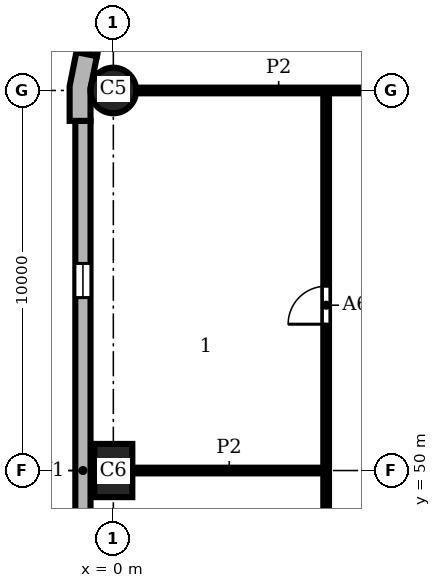
"""IFC4 building model, lengths in metres.
Left out: names, types, materials, properties, quantities, classifications, styles, units other than length and angle.
Written with IfcOpenShell. Run it as: python <this file> out.ifc"""

import sys

from ifc_helpers import new_model, si_unit, direction, frame, frame_2d, origin, origin_2d, place, context, subcontext, project, spatial, polyline, rectangle, circle, outline, extrude, element, fill, save


model = new_model("IFC4")
c1 = context("Model", 3, precision=1e-05, world=origin(), true_north=direction((0.0, 1.0)))
c2 = subcontext(c1, "Body", "Model", "MODEL_VIEW")
j1 = project(units=[si_unit("LENGTHUNIT", "METRE"), si_unit("PLANEANGLEUNIT", "RADIAN")], contexts=[c1])
p1 = place(None, origin())
s1 = spatial("IfcSite", under=j1, at=p1, CompositionType="ELEMENT")
p2 = place(p1, origin())
s2 = spatial("IfcBuilding", under=s1, at=p2, CompositionType="ELEMENT")
p3 = place(p2, frame((0.0, 0.0, 70.5)))
s3 = spatial("IfcBuildingStorey", under=s2, at=p3, CompositionType="ELEMENT", Elevation=70.5)
p4 = place(p3, frame((0.0, 60.0, 0.0), z_axis=(0.0, 0.0, 1.0), x_axis=(1.0, 0.0, 0.0)))
e1 = element("IfcColumn", 1, at=p4, inside=s3, PredefinedType="COLUMN", context=c2, shape_type="SweptSolid", body=[
    extrude(circle(Radius=0.6, at=origin_2d()), origin(), (0.0, 0.0, 1.0), 3.9),
])
p5 = place(p3, frame((0.0, 50.0, 0.0), z_axis=(0.0, 0.0, 1.0), x_axis=(0.0, 1.0, 0.0)))
e2 = element("IfcColumn", 2, at=p5, inside=s3, PredefinedType="COLUMN", context=c2, shape_type="SweptSolid", body=[
    extrude(rectangle(XDim=1.4, YDim=1.0, at=origin_2d()), origin(), (0.0, 0.0, 1.0), 3.9),
])
p6 = place(p3, origin())
e3 = element("IfcWall", 3, at=p6, inside=s3, PredefinedType="SOLIDWALL", context=c2, shape_type="SweptSolid", body=[
    extrude(outline(polyline([(-0.825, 60.98), (-0.972, 61.009), (-1.15, 60.113), (-1.15, 59.2), (-1.0, 59.2), (-0.6, 59.2), (-0.6, 60.059), (-0.432, 60.902), (-0.825, 60.98)])), origin(), (0.0, 0.0, 1.0), 3.9),
])
p7 = place(p3, frame((0.299, 65.602, 0.0), z_axis=(0.0, 0.0, 1.0), x_axis=(-0.195098533057, -0.98078364709, 0.0)))
e4 = element("IfcWall", 4, at=p7, inside=s3, PredefinedType="SOLIDWALL", context=c2, shape_type="SweptSolid", body=[
    extrude(rectangle(XDim=4.753, YDim=0.4, at=frame_2d((2.376, 0.0))), origin(), (0.0, 0.0, 1.0), 3.9),
])
p8 = place(p7, frame((0.226, 0.0, 0.9)))
e5 = element("IfcOpeningElement", 5, at=p8, cuts=e4, PredefinedType="OPENING", context=c2, shape_type="SweptSolid", body=[
    extrude(rectangle(XDim=4.3, YDim=2.35, at=frame_2d((2.15, 1.175))), frame((0.0, 0.21, 0.0), z_axis=(0.0, -1.0, 0.0), x_axis=(1.0, 0.0, 0.0)), (0.0, 0.0, 1.0), 0.42),
])
p9 = place(p3, frame((-0.8, 59.2, 0.0), z_axis=(0.0, 0.0, 1.0), x_axis=(0.0, -1.0, 0.0)))
e6 = element("IfcWall", 6, at=p9, inside=s3, PredefinedType="SOLIDWALL", context=c2, shape_type="SweptSolid", body=[
    extrude(rectangle(XDim=18.4, YDim=0.4, at=frame_2d((9.2, 0.0))), origin(), (0.0, 0.0, 1.0), 3.9),
])
p10 = place(p9, frame((3.75, 0.0, 0.9)))
e7 = element("IfcOpeningElement", 7, at=p10, cuts=e6, PredefinedType="OPENING", context=c2, shape_type="SweptSolid", body=[
    extrude(rectangle(XDim=0.9, YDim=2.35, at=frame_2d((0.45, 1.175))), frame((0.0, 0.21, 0.0), z_axis=(0.0, -1.0, 0.0), x_axis=(1.0, 0.0, 0.0)), (0.0, 0.0, 1.0), 0.42),
])
p11 = place(p9, frame((13.75, 0.0, 0.9)))
e8 = element("IfcOpeningElement", 8, at=p11, cuts=e6, PredefinedType="OPENING", context=c2, shape_type="SweptSolid", body=[
    extrude(rectangle(XDim=0.9, YDim=2.35, at=frame_2d((0.45, 1.175))), frame((0.0, 0.21, 0.0), z_axis=(0.0, -1.0, 0.0), x_axis=(1.0, 0.0, 0.0)), (0.0, 0.0, 1.0), 0.42),
])
p12 = place(p3, frame((5.6, 5.6, 0.0), z_axis=(0.0, 0.0, 1.0), x_axis=(0.0, 1.0, 0.0)))
e9 = element("IfcWall", 9, at=p12, inside=s3, PredefinedType="PARTITIONING", context=c2, shape_type="SweptSolid", body=[
    extrude(rectangle(XDim=54.4, YDim=0.15, at=frame_2d((27.2, 0.0))), origin(), (0.0, 0.0, 1.0), 3.58),
])
p13 = place(p12, frame((4.5, 0.0, 0.0)))
e10 = element("IfcOpeningElement", 10, at=p13, cuts=e9, PredefinedType="OPENING", context=c2, shape_type="SweptSolid", body=[
    extrude(rectangle(XDim=1.0, YDim=2.1, at=frame_2d((0.5, 1.05))), frame((0.0, 0.085, 0.0), z_axis=(0.0, -1.0, 0.0), x_axis=(1.0, 0.0, 0.0)), (0.0, 0.0, 1.0), 0.17),
])
p14 = place(p12, frame((11.25, 0.0, 0.0)))
e11 = element("IfcOpeningElement", 11, at=p14, cuts=e9, PredefinedType="OPENING", context=c2, shape_type="SweptSolid", body=[
    extrude(rectangle(XDim=0.8, YDim=2.1, at=frame_2d((0.4, 1.05))), frame((0.0, 0.085, 0.0), z_axis=(0.0, -1.0, 0.0), x_axis=(1.0, 0.0, 0.0)), (0.0, 0.0, 1.0), 0.17),
])
p15 = place(p12, frame((17.5, 0.0, 0.0)))
e12 = element("IfcOpeningElement", 12, at=p15, cuts=e9, PredefinedType="OPENING", context=c2, shape_type="SweptSolid", body=[
    extrude(rectangle(XDim=1.0, YDim=2.1, at=frame_2d((0.5, 1.05))), frame((0.0, 0.085, 0.0), z_axis=(0.0, -1.0, 0.0), x_axis=(1.0, 0.0, 0.0)), (0.0, 0.0, 1.0), 0.17),
])
p16 = place(p12, frame((30.05, 0.0, 0.0)))
e13 = element("IfcOpeningElement", 13, at=p16, cuts=e9, PredefinedType="OPENING", context=c2, shape_type="SweptSolid", body=[
    extrude(rectangle(XDim=1.0, YDim=2.1, at=frame_2d((0.5, 1.05))), frame((0.0, 0.085, 0.0), z_axis=(0.0, -1.0, 0.0), x_axis=(1.0, 0.0, 0.0)), (0.0, 0.0, 1.0), 0.17),
])
p17 = place(p12, frame((37.75, 0.0, 0.0)))
e14 = element("IfcOpeningElement", 14, at=p17, cuts=e9, PredefinedType="OPENING", context=c2, shape_type="SweptSolid", body=[
    extrude(rectangle(XDim=1.0, YDim=2.1, at=frame_2d((0.5, 1.05))), frame((0.0, 0.085, 0.0), z_axis=(0.0, -1.0, 0.0), x_axis=(1.0, 0.0, 0.0)), (0.0, 0.0, 1.0), 0.17),
])
p18 = place(p12, frame((48.25, 0.0, 0.0)))
e15 = element("IfcOpeningElement", 15, at=p18, cuts=e9, PredefinedType="OPENING", context=c2, shape_type="SweptSolid", body=[
    extrude(rectangle(XDim=1.0, YDim=2.1, at=frame_2d((0.5, 1.05))), frame((0.0, 0.085, 0.0), z_axis=(0.0, -1.0, 0.0), x_axis=(1.0, 0.0, 0.0)), (0.0, 0.0, 1.0), 0.17),
])
p19 = place(p3, frame((0.5, 50.0, 0.0), z_axis=(0.0, 0.0, 1.0), x_axis=(1.0, 0.0, 0.0)))
e16 = element("IfcWall", 16, at=p19, inside=s3, PredefinedType="PARTITIONING", context=c2, shape_type="SweptSolid", body=[
    extrude(rectangle(XDim=5.1, YDim=0.15, at=frame_2d((2.55, 0.0))), origin(), (0.0, 0.0, 1.0), 3.58),
])
p20 = place(p3, frame((0.6, 60.0, 0.0), z_axis=(0.0, 0.0, 1.0), x_axis=(1.0, 0.0, 0.0)))
e17 = element("IfcWall", 17, at=p20, inside=s3, PredefinedType="PARTITIONING", context=c2, shape_type="SweptSolid", body=[
    extrude(rectangle(XDim=7.5, YDim=0.15, at=frame_2d((3.75, 0.0))), origin(), (0.0, 0.0, 1.0), 3.58),
])
p21 = place(p10, origin())
e18 = element("IfcWindow", 18, at=p21, inside=s3, PartitioningType="SINGLE_PANEL", PredefinedType="WINDOW", context=c2, shape_type="SweptSolid", body=[
    extrude(rectangle(XDim=0.9, YDim=2.35, at=frame_2d((0.45, 1.175))), frame((0.0, 0.16, 0.0), z_axis=(0.0, -1.0, 0.0), x_axis=(1.0, 0.0, 0.0)), (0.0, 0.0, 1.0), 0.06),
])
fill(e7, e18)
p22 = place(p18, origin())
e19 = element("IfcDoor", 19, at=p22, inside=s3, OperationType="SINGLE_SWING_LEFT", PredefinedType="DOOR", context=c2, shape_type="SweptSolid", body=[
    extrude(rectangle(XDim=1.0, YDim=2.1, at=frame_2d((0.5, 1.05))), frame((0.0, 0.025, 0.0), z_axis=(0.0, -1.0, 0.0), x_axis=(1.0, 0.0, 0.0)), (0.0, 0.0, 1.0), 0.05),
])
fill(e15, e19)
save(model, sys.argv[1])
